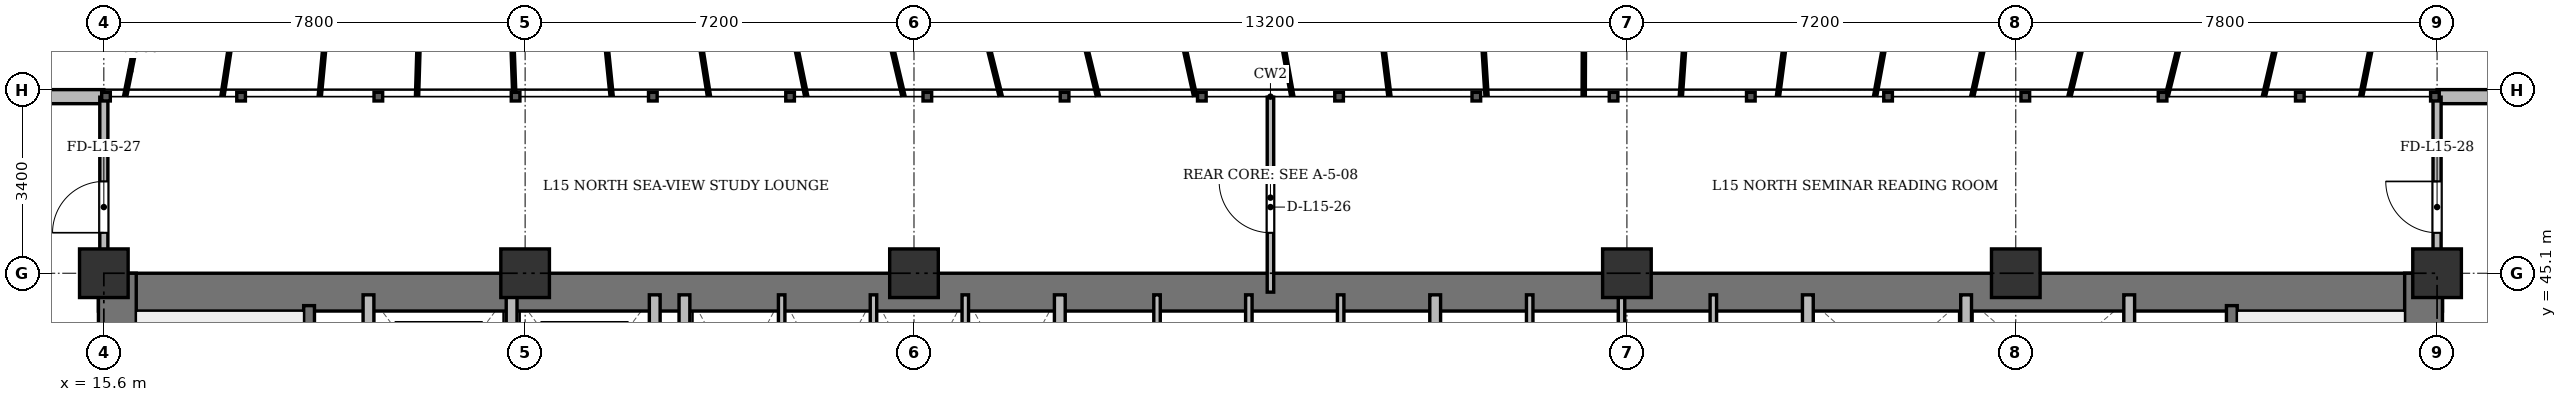
"""IFC4 building model, lengths in metres.
Left out: names, types, materials, properties, quantities, classifications, styles, units other than length and angle.
Written with IfcOpenShell. Run it as: python <this file> out.ifc"""

import sys

from ifc_helpers import new_model, si_unit, direction, frame, frame_2d, origin, origin_2d, place, context, subcontext, project, spatial, rectangle, extrude, source, transform, mapped, element, fill, save


model = new_model("IFC4")
c1 = context("Model", 3, precision=1e-05, world=origin(), true_north=direction((0.0, 1.0)))
c2 = subcontext(c1, "Body", "Model", "MODEL_VIEW")
j1 = project(units=[si_unit("LENGTHUNIT", "METRE"), si_unit("PLANEANGLEUNIT", "RADIAN")], contexts=[c1])
p1 = place(None, origin())
s1 = spatial("IfcSite", under=j1, at=p1, CompositionType="ELEMENT")
p2 = place(p1, origin())
s2 = spatial("IfcBuilding", under=s1, at=p2, CompositionType="ELEMENT")
p3 = place(p2, frame((0.0, 0.0, 59.5)))
s3 = spatial("IfcBuildingStorey", under=s2, at=p3, CompositionType="ELEMENT", Elevation=59.5)
m1 = source(origin(), c2, "Body", "SweptSolid", [
    extrude(rectangle(XDim=0.9, YDim=0.9, at=origin_2d()), origin(), (0.0, 0.0, 1.0), 3.6),
])
for number, where, z_axis, x_axis in (
    (1, (15.6, 45.1, 0.0), (0.0, 0.0, 1.0), (1.0, 0.0, 0.0)),
    (2, (23.4, 45.1, 0.0), (0.0, 0.0, 1.0), (1.0, 0.0, 0.0)),
    (3, (30.6, 45.1, 0.0), (0.0, 0.0, 1.0), (1.0, 0.0, 0.0)),
    (4, (43.8, 45.1, 0.0), (0.0, 0.0, 1.0), (1.0, 0.0, 0.0)),
    (5, (51.0, 45.1, 0.0), (0.0, 0.0, 1.0), (1.0, 0.0, 0.0)),
    (6, (58.8, 45.1, 0.0), (0.0, 0.0, 1.0), (1.0, 0.0, 0.0)),
):
    element("IfcColumn", number, at=place(p3, frame(where, z_axis=z_axis, x_axis=x_axis)), inside=s3, PredefinedType="COLUMN", context=c2, shape_type="MappedRepresentation", body=[
        mapped(m1, transform((0.0, 0.0, 0.0), x_axis=(1.0, 0.0, 0.0), y_axis=(0.0, 1.0, 0.0), z_axis=(0.0, 0.0, 1.0), scale=1.0)),
    ])
p4 = place(p3, frame((7.6, 48.37, 0.0), z_axis=(0.0, 0.0, 1.0), x_axis=(1.0, 0.0, 0.0)))
e7 = element("IfcWall", 7, at=p4, inside=s3, PredefinedType="SOLIDWALL", context=c2, shape_type="SweptSolid", body=[
    extrude(rectangle(XDim=8.0, YDim=0.26, at=frame_2d((4.0, 0.0))), origin(), (0.0, 0.0, 1.0), 3.34),
])
p5 = place(p4, frame((3.325, 0.0, 0.9)))
e8 = element("IfcOpeningElement", 8, at=p5, cuts=e7, PredefinedType="OPENING", context=c2, shape_type="SweptSolid", body=[
    extrude(rectangle(XDim=1.35, YDim=1.5, at=frame_2d((0.675, 0.75))), frame((0.0, 0.14, 0.0), z_axis=(0.0, -1.0, 0.0), x_axis=(1.0, 0.0, 0.0)), (0.0, 0.0, 1.0), 0.28),
])
p6 = place(p3, frame((58.8, 48.37, 0.0), z_axis=(0.0, 0.0, 1.0), x_axis=(1.0, 0.0, 0.0)))
e9 = element("IfcWall", 9, at=p6, inside=s3, PredefinedType="SOLIDWALL", context=c2, shape_type="SweptSolid", body=[
    extrude(rectangle(XDim=8.0, YDim=0.26, at=frame_2d((4.0, 0.0))), origin(), (0.0, 0.0, 1.0), 3.34),
])
p7 = place(p6, frame((3.325, 0.0, 0.9)))
e10 = element("IfcOpeningElement", 10, at=p7, cuts=e9, PredefinedType="OPENING", context=c2, shape_type="SweptSolid", body=[
    extrude(rectangle(XDim=1.35, YDim=1.5, at=frame_2d((0.675, 0.75))), frame((0.0, 0.14, 0.0), z_axis=(0.0, -1.0, 0.0), x_axis=(1.0, 0.0, 0.0)), (0.0, 0.0, 1.0), 0.28),
])
p8 = place(p3, frame((15.5, 44.75, 0.0), z_axis=(0.0, 0.0, 1.0), x_axis=(1.0, 0.0, 0.0)))
e11 = element("IfcWall", 11, at=p8, inside=s3, PredefinedType="SHEAR", context=c2, shape_type="SweptSolid", body=[
    extrude(rectangle(XDim=43.4, YDim=0.7, at=frame_2d((21.7, 0.0))), origin(), (0.0, 0.0, 1.0), 3.34),
])
for number, where, z_axis, x_axis in (
    (12, (15.85, 33.4, 0.0), (0.0, 0.0, 1.0), (0.0, 1.0, 0.0)),
    (13, (58.55, 33.4, 0.0), (0.0, 0.0, 1.0), (0.0, 1.0, 0.0)),
):
    element("IfcWall", number, at=place(p3, frame(where, z_axis=z_axis, x_axis=x_axis)), inside=s3, PredefinedType="SHEAR", context=c2, shape_type="SweptSolid", body=[
        extrude(rectangle(XDim=11.7, YDim=0.7, at=frame_2d((5.85, 0.0))), origin(), (0.0, 0.0, 1.0), 3.34),
    ])
p9 = place(p3, frame((19.4, 33.4, 0.0), z_axis=(0.0, 0.0, 1.0), x_axis=(0.0, 1.0, 0.0)))
e14 = element("IfcWall", 14, at=p9, inside=s3, PredefinedType="SHEAR", context=c2, shape_type="SweptSolid", body=[
    extrude(rectangle(XDim=11.1, YDim=0.2, at=frame_2d((5.55, 0.0))), origin(), (0.0, 0.0, 1.0), 3.34),
])
p10 = place(p9, frame((0.85, 0.0, 0.0)))
e15 = element("IfcOpeningElement", 15, at=p10, cuts=e14, PredefinedType="OPENING", context=c2, shape_type="SweptSolid", body=[
    extrude(rectangle(XDim=1.1, YDim=2.15, at=frame_2d((0.55, 1.075))), frame((0.0, 0.11, 0.0), z_axis=(0.0, -1.0, 0.0), x_axis=(1.0, 0.0, 0.0)), (0.0, 0.0, 1.0), 0.22),
])
p11 = place(p3, frame((55.0, 33.4, 0.0), z_axis=(0.0, 0.0, 1.0), x_axis=(0.0, 1.0, 0.0)))
e16 = element("IfcWall", 16, at=p11, inside=s3, PredefinedType="SHEAR", context=c2, shape_type="SweptSolid", body=[
    extrude(rectangle(XDim=11.1, YDim=0.2, at=frame_2d((5.55, 0.0))), origin(), (0.0, 0.0, 1.0), 3.34),
])
p12 = place(p11, frame((0.85, 0.0, 0.0)))
e17 = element("IfcOpeningElement", 17, at=p12, cuts=e16, PredefinedType="OPENING", context=c2, shape_type="SweptSolid", body=[
    extrude(rectangle(XDim=1.1, YDim=2.15, at=frame_2d((0.55, 1.075))), frame((0.0, 0.11, 0.0), z_axis=(0.0, -1.0, 0.0), x_axis=(1.0, 0.0, 0.0)), (0.0, 0.0, 1.0), 0.22),
])
for number, where, z_axis, x_axis in (
    (18, (20.5, 41.3, 0.0), (0.0, 0.0, 1.0), (0.0, 1.0, 0.0)),
    (19, (23.15, 41.3, 0.0), (0.0, 0.0, 1.0), (0.0, 1.0, 0.0)),
    (20, (25.8, 41.3, 0.0), (0.0, 0.0, 1.0), (0.0, 1.0, 0.0)),
):
    element("IfcWall", number, at=place(p3, frame(where, z_axis=z_axis, x_axis=x_axis)), inside=s3, PredefinedType="SOLIDWALL", context=c2, shape_type="SweptSolid", body=[
        extrude(rectangle(XDim=3.4, YDim=0.2, at=frame_2d((1.7, 0.0))), origin(), (0.0, 0.0, 1.0), 3.34),
    ])
p13 = place(p3, frame((26.35, 33.4, 0.0), z_axis=(0.0, 0.0, 1.0), x_axis=(0.0, 1.0, 0.0)))
e21 = element("IfcWall", 21, at=p13, inside=s3, PredefinedType="SOLIDWALL", context=c2, shape_type="SweptSolid", body=[
    extrude(rectangle(XDim=11.3, YDim=0.2, at=frame_2d((5.65, 0.0))), origin(), (0.0, 0.0, 1.0), 2.69),
])
p14 = place(p3, frame((33.3, 41.5, 0.0), z_axis=(0.0, 0.0, 1.0), x_axis=(0.0, 1.0, 0.0)))
e22 = element("IfcWall", 22, at=p14, inside=s3, PredefinedType="SOLIDWALL", context=c2, shape_type="SweptSolid", body=[
    extrude(rectangle(XDim=3.2, YDim=0.2, at=frame_2d((1.6, 0.0))), origin(), (0.0, 0.0, 1.0), 3.34),
])
for number, where, z_axis, x_axis in (
    (23, (28.15, 41.5, 0.0), (0.0, 0.0, 1.0), (0.0, 1.0, 0.0)),
    (24, (29.85, 41.5, 0.0), (0.0, 0.0, 1.0), (0.0, 1.0, 0.0)),
    (25, (31.55, 41.5, 0.0), (0.0, 0.0, 1.0), (0.0, 1.0, 0.0)),
    (26, (35.1, 41.5, 0.0), (0.0, 0.0, 1.0), (0.0, 1.0, 0.0)),
    (27, (36.8, 41.5, 0.0), (0.0, 0.0, 1.0), (0.0, 1.0, 0.0)),
    (28, (38.5, 41.5, 0.0), (0.0, 0.0, 1.0), (0.0, 1.0, 0.0)),
):
    element("IfcWall", number, at=place(p3, frame(where, z_axis=z_axis, x_axis=x_axis)), inside=s3, PredefinedType="PARTITIONING", context=c2, shape_type="SweptSolid", body=[
        extrude(rectangle(XDim=3.2, YDim=0.12, at=frame_2d((1.6, 0.0))), origin(), (0.0, 0.0, 1.0), 3.34),
    ])
p15 = place(p3, frame((40.25, 41.5, 0.0), z_axis=(0.0, 0.0, 1.0), x_axis=(0.0, 1.0, 0.0)))
e29 = element("IfcWall", 29, at=p15, inside=s3, PredefinedType="SOLIDWALL", context=c2, shape_type="SweptSolid", body=[
    extrude(rectangle(XDim=3.2, YDim=0.2, at=frame_2d((1.6, 0.0))), origin(), (0.0, 0.0, 1.0), 3.34),
])
p16 = place(p3, frame((42.0, 41.5, 0.0), z_axis=(0.0, 0.0, 1.0), x_axis=(0.0, 1.0, 0.0)))
e30 = element("IfcWall", 30, at=p16, inside=s3, PredefinedType="PARTITIONING", context=c2, shape_type="SweptSolid", body=[
    extrude(rectangle(XDim=3.2, YDim=0.12, at=frame_2d((1.6, 0.0))), origin(), (0.0, 0.0, 1.0), 3.34),
])
p17 = place(p3, frame((43.7, 41.5, 0.0), z_axis=(0.0, 0.0, 1.0), x_axis=(0.0, 1.0, 0.0)))
e31 = element("IfcWall", 31, at=p17, inside=s3, PredefinedType="PARTITIONING", context=c2, shape_type="SweptSolid", body=[
    extrude(rectangle(XDim=3.2, YDim=0.12, at=frame_2d((1.6, 0.0))), origin(), (0.0, 0.0, 1.0), 2.752),
])
p18 = place(p3, frame((45.4, 41.5, 0.0), z_axis=(0.0, 0.0, 1.0), x_axis=(0.0, 1.0, 0.0)))
e32 = element("IfcWall", 32, at=p18, inside=s3, PredefinedType="PARTITIONING", context=c2, shape_type="SweptSolid", body=[
    extrude(rectangle(XDim=3.2, YDim=0.12, at=frame_2d((1.6, 0.0))), origin(), (0.0, 0.0, 1.0), 3.34),
])
p19 = place(p3, frame((47.15, 33.4, 0.0), z_axis=(0.0, 0.0, 1.0), x_axis=(0.0, 1.0, 0.0)))
e33 = element("IfcWall", 33, at=p19, inside=s3, PredefinedType="SOLIDWALL", context=c2, shape_type="SweptSolid", body=[
    extrude(rectangle(XDim=11.3, YDim=0.2, at=frame_2d((5.65, 0.0))), origin(), (0.0, 0.0, 1.0), 2.69),
])
for number, where, z_axis, x_axis in (
    (34, (50.08, 42.05, 0.0), (0.0, 0.0, 1.0), (0.0, 1.0, 0.0)),
    (35, (53.1, 42.05, 0.0), (0.0, 0.0, 1.0), (0.0, 1.0, 0.0)),
):
    element("IfcWall", number, at=place(p3, frame(where, z_axis=z_axis, x_axis=x_axis)), inside=s3, PredefinedType="SOLIDWALL", context=c2, shape_type="SweptSolid", body=[
        extrude(rectangle(XDim=2.65, YDim=0.2, at=frame_2d((1.325, 0.0))), origin(), (0.0, 0.0, 1.0), 3.34),
    ])
p20 = place(p3, frame((37.2, 44.75, 0.0), z_axis=(0.0, 0.0, 1.0), x_axis=(0.0, 1.0, 0.0)))
e36 = element("IfcWall", 36, at=p20, inside=s3, PredefinedType="PARTITIONING", context=c2, shape_type="SweptSolid", body=[
    extrude(rectangle(XDim=3.61, YDim=0.12, at=frame_2d((1.805, 0.0))), origin(), (0.0, 0.0, 1.0), 2.69),
])
p21 = place(p20, frame((1.1, 0.0, 0.0)))
e37 = element("IfcOpeningElement", 37, at=p21, cuts=e36, PredefinedType="OPENING", context=c2, shape_type="SweptSolid", body=[
    extrude(rectangle(XDim=0.95, YDim=2.15, at=frame_2d((0.475, 1.075))), frame((0.0, 0.07, 0.0), z_axis=(0.0, -1.0, 0.0), x_axis=(1.0, 0.0, 0.0)), (0.0, 0.0, 1.0), 0.14),
])
p22 = place(p3, frame((15.6, 44.75, 0.0), z_axis=(0.0, 0.0, 1.0), x_axis=(0.0, 1.0, 0.0)))
e38 = element("IfcWall", 38, at=p22, inside=s3, PredefinedType="PARTITIONING", context=c2, shape_type="SweptSolid", body=[
    extrude(rectangle(XDim=3.61, YDim=0.15, at=frame_2d((1.805, 0.0))), origin(), (0.0, 0.0, 1.0), 2.752),
])
p23 = place(p22, frame((1.1, 0.0, 0.0)))
e39 = element("IfcOpeningElement", 39, at=p23, cuts=e38, PredefinedType="OPENING", context=c2, shape_type="SweptSolid", body=[
    extrude(rectangle(XDim=0.95, YDim=2.15, at=frame_2d((0.475, 1.075))), frame((0.0, 0.085, 0.0), z_axis=(0.0, -1.0, 0.0), x_axis=(1.0, 0.0, 0.0)), (0.0, 0.0, 1.0), 0.17),
])
p24 = place(p3, frame((58.8, 44.75, 0.0), z_axis=(0.0, 0.0, 1.0), x_axis=(0.0, 1.0, 0.0)))
e40 = element("IfcWall", 40, at=p24, inside=s3, PredefinedType="PARTITIONING", context=c2, shape_type="SweptSolid", body=[
    extrude(rectangle(XDim=3.61, YDim=0.15, at=frame_2d((1.805, 0.0))), origin(), (0.0, 0.0, 1.0), 2.752),
])
p25 = place(p24, frame((1.1, 0.0, 0.0)))
e41 = element("IfcOpeningElement", 41, at=p25, cuts=e40, PredefinedType="OPENING", context=c2, shape_type="SweptSolid", body=[
    extrude(rectangle(XDim=0.95, YDim=2.15, at=frame_2d((0.475, 1.075))), frame((0.0, 0.085, 0.0), z_axis=(0.0, -1.0, 0.0), x_axis=(1.0, 0.0, 0.0)), (0.0, 0.0, 1.0), 0.17),
])
m2 = source(origin(), c2, "Body", "SweptSolid", [
    extrude(rectangle(XDim=0.95, YDim=2.15, at=frame_2d((0.475, 1.075))), frame((0.0, 0.025, 0.0), z_axis=(0.0, -1.0, 0.0), x_axis=(1.0, 0.0, 0.0)), (0.0, 0.0, 1.0), 0.05),
])
p26 = place(p21, origin())
e42 = element("IfcDoor", 42, at=p26, inside=s3, OperationType="SINGLE_SWING_RIGHT", PredefinedType="DOOR", context=c2, shape_type="MappedRepresentation", body=[
    mapped(m2, transform((0.0, 0.0, 0.0), x_axis=(1.0, 0.0, 0.0), y_axis=(0.0, 1.0, 0.0), z_axis=(0.0, 0.0, 1.0), scale=1.0)),
])
fill(e37, e42)
p27 = place(p23, origin())
e43 = element("IfcDoor", 43, at=p27, inside=s3, OperationType="SINGLE_SWING_LEFT", PredefinedType="DOOR", context=c2, shape_type="MappedRepresentation", body=[
    mapped(m2, transform((0.0, 0.0, 0.0), x_axis=(1.0, 0.0, 0.0), y_axis=(0.0, 1.0, 0.0), z_axis=(0.0, 0.0, 1.0), scale=1.0)),
])
fill(e39, e43)
p28 = place(p25, origin())
e44 = element("IfcDoor", 44, at=p28, inside=s3, OperationType="SINGLE_SWING_RIGHT", PredefinedType="DOOR", context=c2, shape_type="MappedRepresentation", body=[
    mapped(m2, transform((0.0, 0.0, 0.0), x_axis=(1.0, 0.0, 0.0), y_axis=(0.0, 1.0, 0.0), z_axis=(0.0, 0.0, 1.0), scale=1.0)),
])
fill(e41, e44)
save(model, sys.argv[1])
